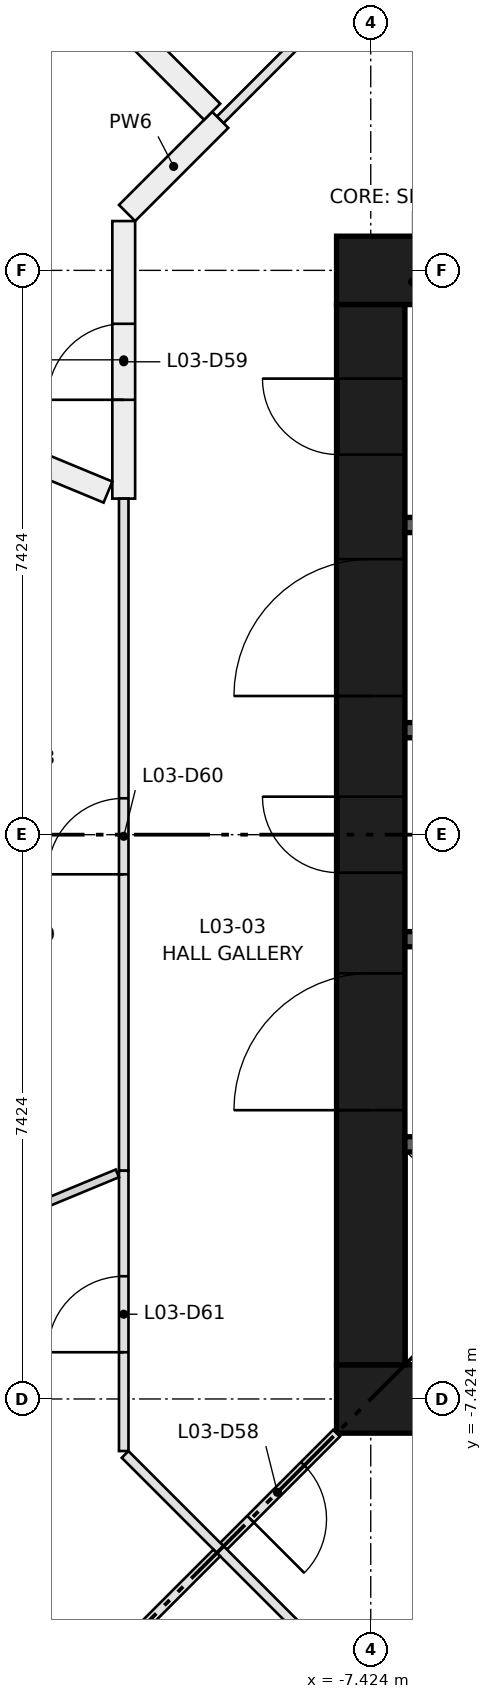
"""IFC4 building model, lengths in metres.
Left out: names, types, materials, properties, quantities, classifications, styles, units other than length and angle.
Written with IfcOpenShell. Run it as: python <this file> out.ifc"""

import sys

from ifc_helpers import new_model, si_unit, direction, frame, frame_2d, origin, place, context, subcontext, project, spatial, rectangle, extrude, element, fill, save


model = new_model("IFC4")
c1 = context("Model", 3, precision=1e-05, world=origin(), true_north=direction((0.0, 1.0)))
c2 = subcontext(c1, "Body", "Model", "MODEL_VIEW")
j1 = project(units=[si_unit("LENGTHUNIT", "METRE"), si_unit("PLANEANGLEUNIT", "RADIAN")], contexts=[c1])
p1 = place(None, origin())
s1 = spatial("IfcSite", under=j1, at=p1, CompositionType="ELEMENT")
p2 = place(p1, origin())
s2 = spatial("IfcBuilding", under=s1, at=p2, CompositionType="ELEMENT")
p3 = place(p2, frame((0.0, 0.0, 14.4)))
s3 = spatial("IfcBuildingStorey", under=s2, at=p3, CompositionType="ELEMENT", Elevation=14.4)
for number, where, z_axis, x_axis in (
    (1, (-7.874, -7.424, 0.0), (0.0, 0.0, 1.0), (1.0, 0.0, 0.0)),
    (2, (-7.874, 7.424, 0.0), (0.0, 0.0, 1.0), (1.0, 0.0, 0.0)),
):
    element("IfcWall", number, at=place(p3, frame(where, z_axis=z_axis, x_axis=x_axis)), inside=s3, PredefinedType="SHEAR", context=c2, shape_type="SweptSolid", body=[
        extrude(rectangle(XDim=15.748, YDim=0.9, at=frame_2d((7.874, 0.0))), origin(), (0.0, 0.0, 1.0), 4.1),
    ])
p4 = place(p3, frame((-7.424, -6.974, 0.0), z_axis=(0.0, 0.0, 1.0), x_axis=(0.0, 1.0, 0.0)))
e3 = element("IfcWall", 3, at=p4, inside=s3, PredefinedType="SHEAR", context=c2, shape_type="SweptSolid", body=[
    extrude(rectangle(XDim=13.948, YDim=0.9, at=frame_2d((6.974, 0.0))), origin(), (0.0, 0.0, 1.0), 4.1),
])
p5 = place(p4, frame((6.474, 0.0, 0.0)))
e4 = element("IfcOpeningElement", 4, at=p5, cuts=e3, PredefinedType="OPENING", context=c2, shape_type="SweptSolid", body=[
    extrude(rectangle(XDim=1.0, YDim=2.1, at=frame_2d((0.5, 1.05))), frame((0.0, 0.46, 0.0), z_axis=(0.0, -1.0, 0.0), x_axis=(1.0, 0.0, 0.0)), (0.0, 0.0, 1.0), 0.92),
])
p6 = place(p4, frame((3.35, 0.0, 0.0)))
e5 = element("IfcOpeningElement", 5, at=p6, cuts=e3, PredefinedType="OPENING", context=c2, shape_type="SweptSolid", body=[
    extrude(rectangle(XDim=1.8, YDim=2.1, at=frame_2d((0.9, 1.05))), frame((0.0, 0.46, 0.0), z_axis=(0.0, -1.0, 0.0), x_axis=(1.0, 0.0, 0.0)), (0.0, 0.0, 1.0), 0.92),
])
p7 = place(p4, frame((8.799, 0.0, 0.0)))
e6 = element("IfcOpeningElement", 6, at=p7, cuts=e3, PredefinedType="OPENING", context=c2, shape_type="SweptSolid", body=[
    extrude(rectangle(XDim=1.8, YDim=2.1, at=frame_2d((0.9, 1.05))), frame((0.0, 0.46, 0.0), z_axis=(0.0, -1.0, 0.0), x_axis=(1.0, 0.0, 0.0)), (0.0, 0.0, 1.0), 0.92),
])
p8 = place(p4, frame((11.974, 0.0, 0.0)))
e7 = element("IfcOpeningElement", 7, at=p8, cuts=e3, PredefinedType="OPENING", context=c2, shape_type="SweptSolid", body=[
    extrude(rectangle(XDim=1.0, YDim=2.1, at=frame_2d((0.5, 1.05))), frame((0.0, 0.46, 0.0), z_axis=(0.0, -1.0, 0.0), x_axis=(1.0, 0.0, 0.0)), (0.0, 0.0, 1.0), 0.92),
])
p9 = place(p3, frame((-6.974, -4.074, 0.0), z_axis=(0.0, 0.0, 1.0), x_axis=(1.0, 0.0, 0.0)))
e8 = element("IfcWall", 8, at=p9, inside=s3, PredefinedType="SHEAR", context=c2, shape_type="SweptSolid", body=[
    extrude(rectangle(XDim=13.948, YDim=0.2, at=frame_2d((6.974, 0.0))), origin(), (0.0, 0.0, 1.0), 3.7),
])
p10 = place(p9, frame((0.918, 0.0, 0.0)))
e9 = element("IfcOpeningElement", 9, at=p10, cuts=e8, PredefinedType="OPENING", context=c2, shape_type="SweptSolid", body=[
    extrude(rectangle(XDim=1.1, YDim=2.1, at=frame_2d((0.55, 1.05))), frame((0.0, 0.11, 0.0), z_axis=(0.0, -1.0, 0.0), x_axis=(1.0, 0.0, 0.0)), (0.0, 0.0, 1.0), 0.22),
])
p11 = place(p9, frame((4.055, 0.0, 0.0)))
e10 = element("IfcOpeningElement", 10, at=p11, cuts=e8, PredefinedType="OPENING", context=c2, shape_type="SweptSolid", body=[
    extrude(rectangle(XDim=1.1, YDim=2.1, at=frame_2d((0.55, 1.05))), frame((0.0, 0.11, 0.0), z_axis=(0.0, -1.0, 0.0), x_axis=(1.0, 0.0, 0.0)), (0.0, 0.0, 1.0), 0.22),
])
p12 = place(p9, frame((6.658, 0.0, 0.0)))
e11 = element("IfcOpeningElement", 11, at=p12, cuts=e8, PredefinedType="OPENING", context=c2, shape_type="SweptSolid", body=[
    extrude(rectangle(XDim=1.0, YDim=2.1, at=frame_2d((0.5, 1.05))), frame((0.0, 0.11, 0.0), z_axis=(0.0, -1.0, 0.0), x_axis=(1.0, 0.0, 0.0)), (0.0, 0.0, 1.0), 0.22),
])
p13 = place(p9, frame((8.627, 0.0, 0.0)))
e12 = element("IfcOpeningElement", 12, at=p13, cuts=e8, PredefinedType="OPENING", context=c2, shape_type="SweptSolid", body=[
    extrude(rectangle(XDim=1.0, YDim=2.1, at=frame_2d((0.5, 1.05))), frame((0.0, 0.11, 0.0), z_axis=(0.0, -1.0, 0.0), x_axis=(1.0, 0.0, 0.0)), (0.0, 0.0, 1.0), 0.22),
])
p14 = place(p9, frame((10.595, 0.0, 0.0)))
e13 = element("IfcOpeningElement", 13, at=p14, cuts=e8, PredefinedType="OPENING", context=c2, shape_type="SweptSolid", body=[
    extrude(rectangle(XDim=1.0, YDim=2.1, at=frame_2d((0.5, 1.05))), frame((0.0, 0.11, 0.0), z_axis=(0.0, -1.0, 0.0), x_axis=(1.0, 0.0, 0.0)), (0.0, 0.0, 1.0), 0.22),
])
p15 = place(p9, frame((12.564, 0.0, 0.0)))
e14 = element("IfcOpeningElement", 14, at=p15, cuts=e8, PredefinedType="OPENING", context=c2, shape_type="SweptSolid", body=[
    extrude(rectangle(XDim=1.0, YDim=2.1, at=frame_2d((0.5, 1.05))), frame((0.0, 0.11, 0.0), z_axis=(0.0, -1.0, 0.0), x_axis=(1.0, 0.0, 0.0)), (0.0, 0.0, 1.0), 0.22),
])
p16 = place(p3, frame((-6.974, 4.074, 0.0), z_axis=(0.0, 0.0, 1.0), x_axis=(1.0, 0.0, 0.0)))
e15 = element("IfcWall", 15, at=p16, inside=s3, PredefinedType="SHEAR", context=c2, shape_type="SweptSolid", body=[
    extrude(rectangle(XDim=6.974, YDim=0.2, at=frame_2d((3.487, 0.0))), origin(), (0.0, 0.0, 1.0), 3.7),
])
for number, where, z_axis, x_axis in (
    (16, (-6.974, -1.375, 0.0), (0.0, 0.0, 1.0), (1.0, 0.0, 0.0)),
    (17, (-6.974, 1.375, 0.0), (0.0, 0.0, 1.0), (1.0, 0.0, 0.0)),
):
    element("IfcWall", number, at=place(p3, frame(where, z_axis=z_axis, x_axis=x_axis)), inside=s3, PredefinedType="SHEAR", context=c2, shape_type="SweptSolid", body=[
        extrude(rectangle(XDim=2.6, YDim=0.2, at=frame_2d((1.3, 0.0))), origin(), (0.0, 0.0, 1.0), 3.7),
    ])
p17 = place(p3, frame((-9.405, 9.405, 0.0), z_axis=(0.0, 0.0, 1.0), x_axis=(0.707106781187, 0.707106781187, 0.0)))
e18 = element("IfcWall", 18, at=p17, inside=s3, PredefinedType="PARTITIONING", context=c2, shape_type="SweptSolid", body=[
    extrude(rectangle(XDim=1.77, YDim=0.125, at=frame_2d((0.885, 0.0))), origin(), (0.0, 0.0, 1.0), 3.7),
])
p18 = place(p3, frame((-7.874, -7.874, 0.0), z_axis=(0.0, 0.0, 1.0), x_axis=(-0.707106781187, -0.707106781187, 0.0)))
e19 = element("IfcWall", 19, at=p18, inside=s3, PredefinedType="PARTITIONING", context=c2, shape_type="SweptSolid", body=[
    extrude(rectangle(XDim=2.102, YDim=0.125, at=frame_2d((1.051, 0.0))), origin(), (0.0, 0.0, 1.0), 3.7),
])
p19 = place(p18, frame((0.6, 0.0, 0.0)))
e20 = element("IfcOpeningElement", 20, at=p19, cuts=e19, PredefinedType="OPENING", context=c2, shape_type="SweptSolid", body=[
    extrude(rectangle(XDim=1.0, YDim=2.1, at=frame_2d((0.5, 1.05))), frame((0.0, 0.073, 0.0), z_axis=(0.0, -1.0, 0.0), x_axis=(1.0, 0.0, 0.0)), (0.0, 0.0, 1.0), 0.145),
])
p20 = place(p3, frame((-10.674, 4.421, 0.0), z_axis=(0.0, 0.0, 1.0), x_axis=(0.0, 1.0, 0.0)))
e21 = element("IfcWall", 21, at=p20, inside=s3, PredefinedType="PARTITIONING", context=c2, shape_type="SweptSolid", body=[
    extrude(rectangle(XDim=3.652, YDim=0.3, at=frame_2d((1.826, 0.0))), origin(), (0.0, 0.0, 1.0), 3.7),
])
p21 = place(p20, frame((1.3, 0.0, 0.0)))
e22 = element("IfcOpeningElement", 22, at=p21, cuts=e21, PredefinedType="OPENING", context=c2, shape_type="SweptSolid", body=[
    extrude(rectangle(XDim=1.0, YDim=2.1, at=frame_2d((0.5, 1.05))), frame((0.0, 0.16, 0.0), z_axis=(0.0, -1.0, 0.0), x_axis=(1.0, 0.0, 0.0)), (0.0, 0.0, 1.0), 0.32),
])
p22 = place(p3, frame((-10.63, 8.179, 0.0), z_axis=(0.0, 0.0, 1.0), x_axis=(0.707106781187, 0.707106781187, 0.0)))
e23 = element("IfcWall", 23, at=p22, inside=s3, PredefinedType="PARTITIONING", context=c2, shape_type="SweptSolid", body=[
    extrude(rectangle(XDim=1.733, YDim=0.3, at=frame_2d((0.867, 0.0))), origin(), (0.0, 0.0, 1.0), 3.7),
])
p23 = place(p3, frame((-10.674, -4.421, 0.0), z_axis=(0.0, 0.0, 1.0), x_axis=(0.0, 1.0, 0.0)))
e24 = element("IfcWall", 24, at=p23, inside=s3, PredefinedType="PARTITIONING", context=c2, shape_type="SweptSolid", body=[
    extrude(rectangle(XDim=8.843, YDim=0.125, at=frame_2d((4.421, 0.0))), origin(), (0.0, 0.0, 1.0), 3.7),
])
p24 = place(p23, frame((3.9, 0.0, 0.0)))
e25 = element("IfcOpeningElement", 25, at=p24, cuts=e24, PredefinedType="OPENING", context=c2, shape_type="SweptSolid", body=[
    extrude(rectangle(XDim=1.0, YDim=2.1, at=frame_2d((0.5, 1.05))), frame((0.0, 0.073, 0.0), z_axis=(0.0, -1.0, 0.0), x_axis=(1.0, 0.0, 0.0)), (0.0, 0.0, 1.0), 0.145),
])
p25 = place(p3, frame((-10.674, -8.109, 0.0), z_axis=(0.0, 0.0, 1.0), x_axis=(0.0, 1.0, 0.0)))
e26 = element("IfcWall", 26, at=p25, inside=s3, PredefinedType="PARTITIONING", context=c2, shape_type="SweptSolid", body=[
    extrude(rectangle(XDim=3.688, YDim=0.125, at=frame_2d((1.844, 0.0))), origin(), (0.0, 0.0, 1.0), 3.7),
])
p26 = place(p25, frame((1.3, 0.0, 0.0)))
e27 = element("IfcOpeningElement", 27, at=p26, cuts=e26, PredefinedType="OPENING", context=c2, shape_type="SweptSolid", body=[
    extrude(rectangle(XDim=1.0, YDim=2.1, at=frame_2d((0.5, 1.05))), frame((0.0, 0.073, 0.0), z_axis=(0.0, -1.0, 0.0), x_axis=(1.0, 0.0, 0.0)), (0.0, 0.0, 1.0), 0.145),
])
for number, where, z_axis, x_axis in (
    (28, (-9.405, -9.405, 0.0), (0.0, 0.0, 1.0), (-0.707, 0.707, 0.0)),
    (29, (-8.153, -10.656, 0.0), (0.0, 0.0, 1.0), (-0.707, 0.707, 0.0)),
):
    element("IfcWall", number, at=place(p3, frame(where, z_axis=z_axis, x_axis=x_axis)), inside=s3, PredefinedType="PARTITIONING", context=c2, shape_type="SweptSolid", body=[
        extrude(rectangle(XDim=1.77, YDim=0.125, at=frame_2d((0.885, 0.0))), origin(), (0.0, 0.0, 1.0), 3.7),
    ])
p27 = place(p3, frame((-9.51, 9.51, 0.0), z_axis=(0.0, 0.0, 1.0), x_axis=(-0.707106781187, 0.707106781187, 0.0)))
e30 = element("IfcWall", 30, at=p27, inside=s3, PredefinedType="PARTITIONING", context=c2, shape_type="SweptSolid", body=[
    extrude(rectangle(XDim=5.21, YDim=0.3, at=frame_2d((2.605, 0.0))), origin(), (0.0, 0.0, 1.0), 3.7),
])
p28 = place(p3, frame((-10.881, 4.507, 0.0), z_axis=(0.0, 0.0, 1.0), x_axis=(-0.923868654676, 0.382709692726, 0.0)))
e31 = element("IfcWall", 31, at=p28, inside=s3, PredefinedType="PARTITIONING", context=c2, shape_type="SweptSolid", body=[
    extrude(rectangle(XDim=3.012, YDim=0.3, at=frame_2d((1.506, 0.0))), origin(), (0.0, 0.0, 1.0), 3.7),
])
p29 = place(p3, frame((-10.758, -4.456, 0.0), z_axis=(0.0, 0.0, 1.0), x_axis=(-0.923869290096, -0.382708158807, 0.0)))
e32 = element("IfcWall", 32, at=p29, inside=s3, PredefinedType="PARTITIONING", context=c2, shape_type="SweptSolid", body=[
    extrude(rectangle(XDim=3.146, YDim=0.11, at=frame_2d((1.573, 0.0))), origin(), (0.0, 0.0, 1.0), 3.7),
])
p30 = place(p3, frame((-9.449, -9.449, 0.0), z_axis=(0.0, 0.0, 1.0), x_axis=(-0.707106781187, -0.707106781187, 0.0)))
e33 = element("IfcWall", 33, at=p30, inside=s3, PredefinedType="PARTITIONING", context=c2, shape_type="SweptSolid", body=[
    extrude(rectangle(XDim=5.297, YDim=0.125, at=frame_2d((2.649, 0.0))), origin(), (0.0, 0.0, 1.0), 3.7),
])
p31 = place(p5, origin())
e34 = element("IfcDoor", 34, at=p31, inside=s3, OperationType="SINGLE_SWING_RIGHT", PredefinedType="DOOR", context=c2, shape_type="SweptSolid", body=[
    extrude(rectangle(XDim=1.0, YDim=2.1, at=frame_2d((0.5, 1.05))), frame((0.0, 0.45, 0.0), z_axis=(0.0, -1.0, 0.0), x_axis=(1.0, 0.0, 0.0)), (0.0, 0.0, 1.0), 0.05),
])
fill(e4, e34)
p32 = place(p6, origin())
e35 = element("IfcDoor", 35, at=p32, inside=s3, OperationType="DOUBLE_DOOR_SINGLE_SWING", PredefinedType="DOOR", context=c2, shape_type="SweptSolid", body=[
    extrude(rectangle(XDim=1.8, YDim=2.1, at=frame_2d((0.9, 1.05))), frame((0.0, 0.025, 0.0), z_axis=(0.0, -1.0, 0.0), x_axis=(1.0, 0.0, 0.0)), (0.0, 0.0, 1.0), 0.05),
])
fill(e5, e35)
p33 = place(p7, origin())
e36 = element("IfcDoor", 36, at=p33, inside=s3, OperationType="DOUBLE_DOOR_SINGLE_SWING", PredefinedType="DOOR", context=c2, shape_type="SweptSolid", body=[
    extrude(rectangle(XDim=1.8, YDim=2.1, at=frame_2d((0.9, 1.05))), frame((0.0, 0.025, 0.0), z_axis=(0.0, -1.0, 0.0), x_axis=(1.0, 0.0, 0.0)), (0.0, 0.0, 1.0), 0.05),
])
fill(e6, e36)
p34 = place(p8, origin())
e37 = element("IfcDoor", 37, at=p34, inside=s3, OperationType="SINGLE_SWING_RIGHT", PredefinedType="DOOR", context=c2, shape_type="SweptSolid", body=[
    extrude(rectangle(XDim=1.0, YDim=2.1, at=frame_2d((0.5, 1.05))), frame((0.0, 0.45, 0.0), z_axis=(0.0, -1.0, 0.0), x_axis=(1.0, 0.0, 0.0)), (0.0, 0.0, 1.0), 0.05),
])
fill(e7, e37)
p35 = place(p19, origin())
e38 = element("IfcDoor", 38, at=p35, inside=s3, OperationType="SINGLE_SWING_RIGHT", PredefinedType="DOOR", context=c2, shape_type="SweptSolid", body=[
    extrude(rectangle(XDim=1.0, YDim=2.1, at=frame_2d((0.5, 1.05))), frame((0.0, 0.025, 0.0), z_axis=(0.0, -1.0, 0.0), x_axis=(1.0, 0.0, 0.0)), (0.0, 0.0, 1.0), 0.05),
])
fill(e20, e38)
p36 = place(p21, origin())
e39 = element("IfcDoor", 39, at=p36, inside=s3, OperationType="SINGLE_SWING_LEFT", PredefinedType="DOOR", context=c2, shape_type="SweptSolid", body=[
    extrude(rectangle(XDim=1.0, YDim=2.1, at=frame_2d((0.5, 1.05))), frame((0.0, 0.025, 0.0), z_axis=(0.0, -1.0, 0.0), x_axis=(1.0, 0.0, 0.0)), (0.0, 0.0, 1.0), 0.05),
])
fill(e22, e39)
p37 = place(p24, origin())
e40 = element("IfcDoor", 40, at=p37, inside=s3, OperationType="SINGLE_SWING_LEFT", PredefinedType="DOOR", context=c2, shape_type="SweptSolid", body=[
    extrude(rectangle(XDim=1.0, YDim=2.1, at=frame_2d((0.5, 1.05))), frame((0.0, 0.025, 0.0), z_axis=(0.0, -1.0, 0.0), x_axis=(1.0, 0.0, 0.0)), (0.0, 0.0, 1.0), 0.05),
])
fill(e25, e40)
p38 = place(p26, origin())
e41 = element("IfcDoor", 41, at=p38, inside=s3, OperationType="SINGLE_SWING_LEFT", PredefinedType="DOOR", context=c2, shape_type="SweptSolid", body=[
    extrude(rectangle(XDim=1.0, YDim=2.1, at=frame_2d((0.5, 1.05))), frame((0.0, 0.025, 0.0), z_axis=(0.0, -1.0, 0.0), x_axis=(1.0, 0.0, 0.0)), (0.0, 0.0, 1.0), 0.05),
])
fill(e27, e41)
save(model, sys.argv[1])
